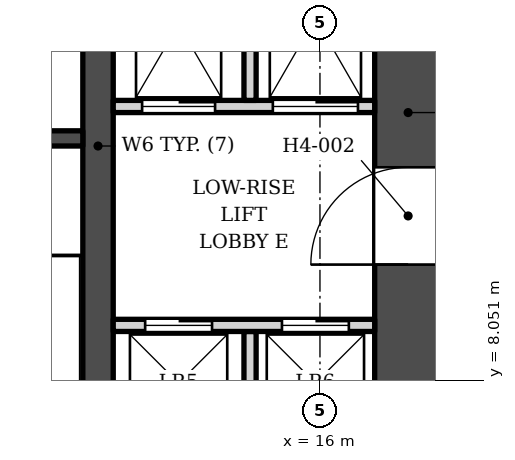
"""IFC4 building model, lengths in metres.
Left out: names, types, materials, properties, quantities, classifications, styles, units other than length and angle.
Written with IfcOpenShell. Run it as: python <this file> out.ifc"""

import sys

from ifc_helpers import new_model, si_unit, direction, frame, frame_2d, origin, place, context, subcontext, project, spatial, rectangle, extrude, element, fill, save


model = new_model("IFC4")
c1 = context("Model", 3, precision=1e-05, world=origin(), true_north=direction((0.0, 1.0)))
c2 = subcontext(c1, "Body", "Model", "MODEL_VIEW")
j1 = project(units=[si_unit("LENGTHUNIT", "METRE"), si_unit("PLANEANGLEUNIT", "RADIAN")], contexts=[c1])
p1 = place(None, origin())
s1 = spatial("IfcSite", under=j1, at=p1, CompositionType="ELEMENT")
p2 = place(p1, origin())
s2 = spatial("IfcBuilding", under=s1, at=p2, CompositionType="ELEMENT")
p3 = place(p2, frame((0.0, 0.0, 76.6)))
s3 = spatial("IfcBuildingStorey", under=s2, at=p3, CompositionType="ELEMENT", Elevation=76.6)
p4 = place(p3, frame((12.35, 5.253, 0.0), z_axis=(0.0, 0.0, 1.0), x_axis=(0.0, 1.0, 0.0)))
e1 = element("IfcWall", 1, at=p4, inside=s3, PredefinedType="SHEAR", context=c2, shape_type="SweptSolid", body=[
    extrude(rectangle(XDim=13.3, YDim=0.5, at=frame_2d((6.65, 0.0))), origin(), (0.0, 0.0, 1.0), 3.4),
])
p5 = place(p3, frame((8.35, 12.028, 0.0), z_axis=(0.0, 0.0, 1.0), x_axis=(1.0, 0.0, 0.0)))
e2 = element("IfcWall", 2, at=p5, inside=s3, PredefinedType="SHEAR", context=c2, shape_type="SweptSolid", body=[
    extrude(rectangle(XDim=3.75, YDim=0.25, at=frame_2d((1.875, 0.0))), origin(), (0.0, 0.0, 1.0), 3.4),
])
p6 = place(p3, frame((17.45, 5.853, 0.0), z_axis=(0.0, 0.0, 1.0), x_axis=(0.0, 1.0, 0.0)))
e3 = element("IfcWall", 3, at=p6, inside=s3, PredefinedType="SHEAR", context=c2, shape_type="SweptSolid", body=[
    extrude(rectangle(XDim=13.2, YDim=1.1, at=frame_2d((6.6, 0.0))), origin(), (0.0, 0.0, 1.0), 3.4),
])
p7 = place(p6, frame((4.1, 0.0, 0.0)))
e4 = element("IfcOpeningElement", 4, at=p7, cuts=e3, PredefinedType="OPENING", context=c2, shape_type="SweptSolid", body=[
    extrude(rectangle(XDim=1.6, YDim=2.1, at=frame_2d((0.8, 1.05))), frame((0.0, 0.56, 0.0), z_axis=(0.0, -1.0, 0.0), x_axis=(1.0, 0.0, 0.0)), (0.0, 0.0, 1.0), 1.12),
])
p8 = place(p6, frame((10.15, 0.0, 0.0)))
e5 = element("IfcOpeningElement", 5, at=p8, cuts=e3, PredefinedType="OPENING", context=c2, shape_type="SweptSolid", body=[
    extrude(rectangle(XDim=0.9, YDim=2.1, at=frame_2d((0.45, 1.05))), frame((0.0, 0.56, 0.0), z_axis=(0.0, -1.0, 0.0), x_axis=(1.0, 0.0, 0.0)), (0.0, 0.0, 1.0), 1.12),
])
p9 = place(p3, frame((14.85, 6.353, 0.0), z_axis=(0.0, 0.0, 1.0), x_axis=(0.0, 1.0, 0.0)))
e6 = element("IfcWall", 6, at=p9, inside=s3, PredefinedType="SOLIDWALL", context=c2, shape_type="SweptSolid", body=[
    extrude(rectangle(XDim=2.5, YDim=0.2, at=frame_2d((1.25, 0.0))), origin(), (0.0, 0.0, 1.0), 3.23),
])
p10 = place(p3, frame((12.6, 8.953, 0.0), z_axis=(0.0, 0.0, 1.0), x_axis=(1.0, 0.0, 0.0)))
e7 = element("IfcWall", 7, at=p10, inside=s3, PredefinedType="SOLIDWALL", context=c2, shape_type="SweptSolid", body=[
    extrude(rectangle(XDim=4.3, YDim=0.2, at=frame_2d((2.15, 0.0))), origin(), (0.0, 0.0, 1.0), 3.23),
])
p11 = place(p10, frame((0.525, 0.0, 0.0)))
e8 = element("IfcOpeningElement", 8, at=p11, cuts=e7, PredefinedType="OPENING", context=c2, shape_type="SweptSolid", body=[
    extrude(rectangle(XDim=1.1, YDim=2.1, at=frame_2d((0.55, 1.05))), frame((0.0, 0.11, 0.0), z_axis=(0.0, -1.0, 0.0), x_axis=(1.0, 0.0, 0.0)), (0.0, 0.0, 1.0), 0.22),
])
p12 = place(p10, frame((2.775, 0.0, 0.0)))
e9 = element("IfcOpeningElement", 9, at=p12, cuts=e7, PredefinedType="OPENING", context=c2, shape_type="SweptSolid", body=[
    extrude(rectangle(XDim=1.1, YDim=2.1, at=frame_2d((0.55, 1.05))), frame((0.0, 0.11, 0.0), z_axis=(0.0, -1.0, 0.0), x_axis=(1.0, 0.0, 0.0)), (0.0, 0.0, 1.0), 0.22),
])
p13 = place(p3, frame((12.6, 12.552, 0.0), z_axis=(0.0, 0.0, 1.0), x_axis=(1.0, 0.0, 0.0)))
e10 = element("IfcWall", 10, at=p13, inside=s3, PredefinedType="SOLIDWALL", context=c2, shape_type="SweptSolid", body=[
    extrude(rectangle(XDim=4.3, YDim=0.2, at=frame_2d((2.15, 0.0))), origin(), (0.0, 0.0, 1.0), 3.23),
])
p14 = place(p13, frame((0.475, 0.0, 0.0)))
e11 = element("IfcOpeningElement", 11, at=p14, cuts=e10, PredefinedType="OPENING", context=c2, shape_type="SweptSolid", body=[
    extrude(rectangle(XDim=1.2, YDim=2.1, at=frame_2d((0.6, 1.05))), frame((0.0, 0.11, 0.0), z_axis=(0.0, -1.0, 0.0), x_axis=(1.0, 0.0, 0.0)), (0.0, 0.0, 1.0), 0.22),
])
p15 = place(p13, frame((2.625, 0.0, 0.0)))
e12 = element("IfcOpeningElement", 12, at=p15, cuts=e10, PredefinedType="OPENING", context=c2, shape_type="SweptSolid", body=[
    extrude(rectangle(XDim=1.4, YDim=2.1, at=frame_2d((0.7, 1.05))), frame((0.0, 0.11, 0.0), z_axis=(0.0, -1.0, 0.0), x_axis=(1.0, 0.0, 0.0)), (0.0, 0.0, 1.0), 0.22),
])
p16 = place(p3, frame((14.85, 12.653, 0.0), z_axis=(0.0, 0.0, 1.0), x_axis=(0.0, 1.0, 0.0)))
e13 = element("IfcWall", 13, at=p16, inside=s3, PredefinedType="SOLIDWALL", context=c2, shape_type="SweptSolid", body=[
    extrude(rectangle(XDim=3.0, YDim=0.2, at=frame_2d((1.5, 0.0))), origin(), (0.0, 0.0, 1.0), 3.23),
])
p17 = place(p11, origin())
e14 = element("IfcDoor", 14, at=p17, inside=s3, OperationType="DOUBLE_DOOR_SLIDING", PredefinedType="DOOR", context=c2, shape_type="SweptSolid", body=[
    extrude(rectangle(XDim=1.1, YDim=2.1, at=frame_2d((0.55, 1.05))), frame((0.0, 0.025, 0.0), z_axis=(0.0, -1.0, 0.0), x_axis=(1.0, 0.0, 0.0)), (0.0, 0.0, 1.0), 0.05),
])
fill(e8, e14)
p18 = place(p12, origin())
e15 = element("IfcDoor", 15, at=p18, inside=s3, OperationType="DOUBLE_DOOR_SLIDING", PredefinedType="DOOR", context=c2, shape_type="SweptSolid", body=[
    extrude(rectangle(XDim=1.1, YDim=2.1, at=frame_2d((0.55, 1.05))), frame((0.0, 0.025, 0.0), z_axis=(0.0, -1.0, 0.0), x_axis=(1.0, 0.0, 0.0)), (0.0, 0.0, 1.0), 0.05),
])
fill(e9, e15)
p19 = place(p14, origin())
e16 = element("IfcDoor", 16, at=p19, inside=s3, OperationType="DOUBLE_DOOR_SLIDING", PredefinedType="DOOR", context=c2, shape_type="SweptSolid", body=[
    extrude(rectangle(XDim=1.2, YDim=2.1, at=frame_2d((0.6, 1.05))), frame((0.0, 0.025, 0.0), z_axis=(0.0, -1.0, 0.0), x_axis=(1.0, 0.0, 0.0)), (0.0, 0.0, 1.0), 0.05),
])
fill(e11, e16)
p20 = place(p15, origin())
e17 = element("IfcDoor", 17, at=p20, inside=s3, OperationType="DOUBLE_DOOR_SLIDING", PredefinedType="DOOR", context=c2, shape_type="SweptSolid", body=[
    extrude(rectangle(XDim=1.4, YDim=2.1, at=frame_2d((0.7, 1.05))), frame((0.0, 0.025, 0.0), z_axis=(0.0, -1.0, 0.0), x_axis=(1.0, 0.0, 0.0)), (0.0, 0.0, 1.0), 0.05),
])
fill(e12, e17)
p21 = place(p7, origin())
e18 = element("IfcDoor", 18, at=p21, inside=s3, OperationType="DOUBLE_DOOR_SINGLE_SWING", PredefinedType="DOOR", context=c2, shape_type="SweptSolid", body=[
    extrude(rectangle(XDim=1.6, YDim=2.1, at=frame_2d((0.8, 1.05))), frame((0.0, 0.275, 0.0), z_axis=(0.0, -1.0, 0.0), x_axis=(1.0, 0.0, 0.0)), (0.0, 0.0, 1.0), 0.05),
])
fill(e4, e18)
save(model, sys.argv[1])
